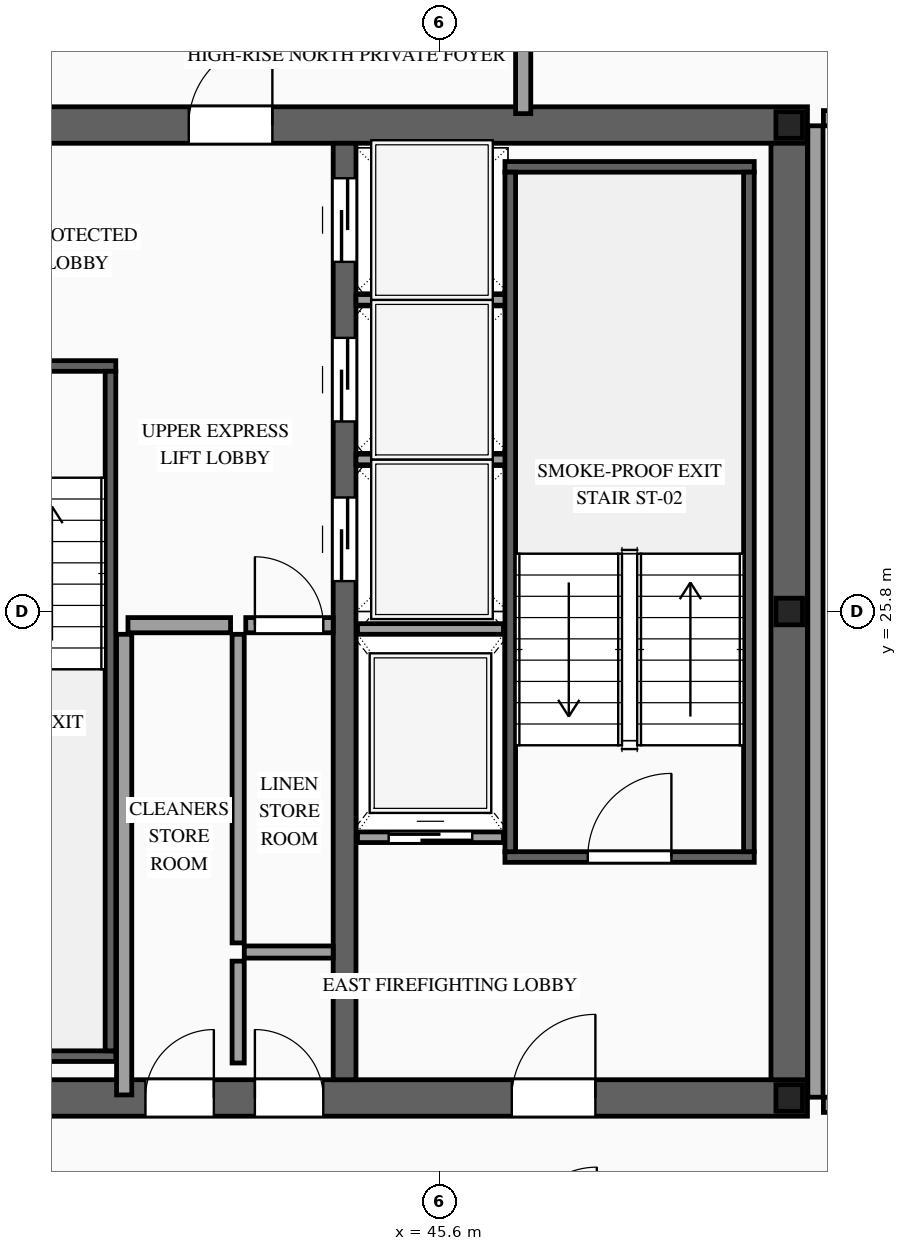
"""IFC4 building model, lengths in metres.
Left out: names, types, materials, properties, quantities, classifications, styles, units other than length and angle.
Written with IfcOpenShell. Run it as: python <this file> out.ifc"""

import sys

from ifc_helpers import new_model, si_unit, direction, frame, frame_2d, origin, origin_2d, place, context, subcontext, project, spatial, rectangle, i_section, extrude, source, transform, mapped, element, fill, save


model = new_model("IFC4")
c1 = context("Model", 3, precision=1e-05, world=origin(), true_north=direction((0.0, 1.0)))
c2 = subcontext(c1, "Body", "Model", "MODEL_VIEW")
j1 = project(units=[si_unit("LENGTHUNIT", "METRE"), si_unit("PLANEANGLEUNIT", "RADIAN")], contexts=[c1])
p1 = place(None, origin())
s1 = spatial("IfcSite", under=j1, at=p1, CompositionType="ELEMENT")
p2 = place(p1, origin())
s2 = spatial("IfcBuilding", under=s1, at=p2, CompositionType="ELEMENT")
p3 = place(p2, frame((0.0, 0.0, 285.6)))
s3 = spatial("IfcBuildingStorey", under=s2, at=p3, CompositionType="ELEMENT", Elevation=285.6)
p4 = place(p3, frame((23.56, 19.4, 0.0), z_axis=(0.0, 0.0, 1.0), x_axis=(1.0, 0.0, 0.0)))
e1 = element("IfcWall", 1, at=p4, inside=s3, PredefinedType="SHEAR", context=c2, shape_type="SweptSolid", body=[
    extrude(rectangle(XDim=26.88, YDim=0.48, at=frame_2d((13.44, 0.0))), origin(), (0.0, 0.0, 1.0), 3.5),
])
p5 = place(p4, frame((1.89, 0.0, 0.0)))
e2 = element("IfcOpeningElement", 2, at=p5, cuts=e1, PredefinedType="OPENING", context=c2, shape_type="SweptSolid", body=[
    extrude(rectangle(XDim=1.1, YDim=2.2, at=frame_2d((0.55, 1.1))), frame((0.0, 0.255, 0.0), z_axis=(0.0, -1.0, 0.0), x_axis=(1.0, 0.0, 0.0)), (0.0, 0.0, 1.0), 0.51),
])
p6 = place(p4, frame((9.79, 0.0, 0.0)))
e3 = element("IfcOpeningElement", 3, at=p6, cuts=e1, PredefinedType="OPENING", context=c2, shape_type="SweptSolid", body=[
    extrude(rectangle(XDim=1.1, YDim=2.2, at=frame_2d((0.55, 1.1))), frame((0.0, 0.255, 0.0), z_axis=(0.0, -1.0, 0.0), x_axis=(1.0, 0.0, 0.0)), (0.0, 0.0, 1.0), 0.51),
])
p7 = place(p4, frame((22.99, 0.0, 0.0)))
e4 = element("IfcOpeningElement", 4, at=p7, cuts=e1, PredefinedType="OPENING", context=c2, shape_type="SweptSolid", body=[
    extrude(rectangle(XDim=1.1, YDim=2.2, at=frame_2d((0.55, 1.1))), frame((0.0, 0.255, 0.0), z_axis=(0.0, -1.0, 0.0), x_axis=(1.0, 0.0, 0.0)), (0.0, 0.0, 1.0), 0.51),
])
p8 = place(p4, frame((19.61, 0.0, 0.0)))
e5 = element("IfcOpeningElement", 5, at=p8, cuts=e1, PredefinedType="OPENING", context=c2, shape_type="SweptSolid", body=[
    extrude(rectangle(XDim=0.9, YDim=2.15, at=frame_2d((0.45, 1.075))), frame((0.0, 0.255, 0.0), z_axis=(0.0, -1.0, 0.0), x_axis=(1.0, 0.0, 0.0)), (0.0, 0.0, 1.0), 0.51),
])
p9 = place(p4, frame((18.17, 0.0, 0.0)))
e6 = element("IfcOpeningElement", 6, at=p9, cuts=e1, PredefinedType="OPENING", context=c2, shape_type="SweptSolid", body=[
    extrude(rectangle(XDim=0.9, YDim=2.15, at=frame_2d((0.45, 1.075))), frame((0.0, 0.255, 0.0), z_axis=(0.0, -1.0, 0.0), x_axis=(1.0, 0.0, 0.0)), (0.0, 0.0, 1.0), 0.51),
])
p10 = place(p3, frame((23.56, 32.2, 0.0), z_axis=(0.0, 0.0, 1.0), x_axis=(1.0, 0.0, 0.0)))
e7 = element("IfcWall", 7, at=p10, inside=s3, PredefinedType="SHEAR", context=c2, shape_type="SweptSolid", body=[
    extrude(rectangle(XDim=26.88, YDim=0.48, at=frame_2d((13.44, 0.0))), origin(), (0.0, 0.0, 1.0), 3.5),
])
p11 = place(p10, frame((4.51, 0.0, 0.0)))
e8 = element("IfcOpeningElement", 8, at=p11, cuts=e7, PredefinedType="OPENING", context=c2, shape_type="SweptSolid", body=[
    extrude(rectangle(XDim=0.9, YDim=2.15, at=frame_2d((0.45, 1.075))), frame((0.0, 0.255, 0.0), z_axis=(0.0, -1.0, 0.0), x_axis=(1.0, 0.0, 0.0)), (0.0, 0.0, 1.0), 0.51),
])
p12 = place(p10, frame((9.79, 0.0, 0.0)))
e9 = element("IfcOpeningElement", 9, at=p12, cuts=e7, PredefinedType="OPENING", context=c2, shape_type="SweptSolid", body=[
    extrude(rectangle(XDim=1.1, YDim=2.2, at=frame_2d((0.55, 1.1))), frame((0.0, 0.255, 0.0), z_axis=(0.0, -1.0, 0.0), x_axis=(1.0, 0.0, 0.0)), (0.0, 0.0, 1.0), 0.51),
])
p13 = place(p10, frame((15.64, 0.0, 0.0)))
e10 = element("IfcOpeningElement", 10, at=p13, cuts=e7, PredefinedType="OPENING", context=c2, shape_type="SweptSolid", body=[
    extrude(rectangle(XDim=1.1, YDim=2.2, at=frame_2d((0.55, 1.1))), frame((0.0, 0.255, 0.0), z_axis=(0.0, -1.0, 0.0), x_axis=(1.0, 0.0, 0.0)), (0.0, 0.0, 1.0), 0.51),
])
p14 = place(p10, frame((18.74, 0.0, 0.0)))
e11 = element("IfcOpeningElement", 11, at=p14, cuts=e7, PredefinedType="OPENING", context=c2, shape_type="SweptSolid", body=[
    extrude(rectangle(XDim=1.1, YDim=2.2, at=frame_2d((0.55, 1.1))), frame((0.0, 0.255, 0.0), z_axis=(0.0, -1.0, 0.0), x_axis=(1.0, 0.0, 0.0)), (0.0, 0.0, 1.0), 0.51),
])
m1 = source(origin(), c2, "Body", "SweptSolid", [
    extrude(rectangle(XDim=12.32, YDim=0.48, at=frame_2d((6.16, 0.0))), origin(), (0.0, 0.0, 1.0), 3.5),
])
p15 = place(p3, frame((50.2, 19.64, 0.0), z_axis=(0.0, 0.0, 1.0), x_axis=(0.0, 1.0, 0.0)))
e12 = element("IfcWall", 12, at=p15, inside=s3, PredefinedType="SHEAR", context=c2, shape_type="MappedRepresentation", body=[
    mapped(m1, transform((0.0, 0.0, 0.0), scale=1.0)),
])
p16 = place(p3, frame((44.35, 19.64, 0.0), z_axis=(0.0, 0.0, 1.0), x_axis=(0.0, 1.0, 0.0)))
e13 = element("IfcWall", 13, at=p16, inside=s3, PredefinedType="SOLIDWALL", context=c2, shape_type="SweptSolid", body=[
    extrude(rectangle(XDim=12.32, YDim=0.3, at=frame_2d((6.16, 0.0))), origin(), (0.0, 0.0, 1.0), 3.5),
])
p17 = place(p16, frame((6.56, 0.0, 0.0)))
e14 = element("IfcOpeningElement", 14, at=p17, cuts=e13, PredefinedType="OPENING", context=c2, shape_type="SweptSolid", body=[
    extrude(rectangle(XDim=1.1, YDim=2.2, at=frame_2d((0.55, 1.1))), frame((0.0, 0.165, 0.0), z_axis=(0.0, -1.0, 0.0), x_axis=(1.0, 0.0, 0.0)), (0.0, 0.0, 1.0), 0.33),
])
p18 = place(p16, frame((8.66, 0.0, 0.0)))
e15 = element("IfcOpeningElement", 15, at=p18, cuts=e13, PredefinedType="OPENING", context=c2, shape_type="SweptSolid", body=[
    extrude(rectangle(XDim=1.1, YDim=2.2, at=frame_2d((0.55, 1.1))), frame((0.0, 0.165, 0.0), z_axis=(0.0, -1.0, 0.0), x_axis=(1.0, 0.0, 0.0)), (0.0, 0.0, 1.0), 0.33),
])
p19 = place(p16, frame((10.76, 0.0, 0.0)))
e16 = element("IfcOpeningElement", 16, at=p19, cuts=e13, PredefinedType="OPENING", context=c2, shape_type="SweptSolid", body=[
    extrude(rectangle(XDim=1.1, YDim=2.2, at=frame_2d((0.55, 1.1))), frame((0.0, 0.165, 0.0), z_axis=(0.0, -1.0, 0.0), x_axis=(1.0, 0.0, 0.0)), (0.0, 0.0, 1.0), 0.33),
])
m2 = source(origin(), c2, "Body", "SweptSolid", [
    extrude(i_section(OverallWidth=0.35, OverallDepth=0.35, WebThickness=0.012, FlangeThickness=0.019, at=origin_2d()), origin(), (0.0, 0.0, 1.0), 3.5),
])
for number, where, z_axis, x_axis in (
    (17, (50.2, 19.4, 0.0), (0.0, 0.0, 1.0), (1.0, 0.0, 0.0)),
    (18, (50.2, 25.8, 0.0), (0.0, 0.0, 1.0), (1.0, 0.0, 0.0)),
    (19, (50.2, 32.2, 0.0), (0.0, 0.0, 1.0), (1.0, 0.0, 0.0)),
):
    element("IfcColumn", number, at=place(p3, frame(where, z_axis=z_axis, x_axis=x_axis)), inside=s3, PredefinedType="COLUMN", context=c2, shape_type="MappedRepresentation", body=[
        mapped(m2, transform((0.0, 0.0, 0.0), scale=1.0)),
    ])
p20 = place(p3, frame((44.52, 22.83, 0.0), z_axis=(0.0, 0.0, 1.0), x_axis=(1.0, 0.0, 0.0)))
e20 = element("IfcWall", 20, at=p20, inside=s3, PredefinedType="SOLIDWALL", context=c2, shape_type="SweptSolid", body=[
    extrude(rectangle(XDim=1.92, YDim=0.14, at=frame_2d((0.96, 0.0))), origin(), (0.0, 0.0, 1.0), 3.28),
])
p21 = place(p20, frame((0.41, 0.0, 0.0)))
e21 = element("IfcOpeningElement", 21, at=p21, cuts=e20, PredefinedType="OPENING", context=c2, shape_type="SweptSolid", body=[
    extrude(rectangle(XDim=1.1, YDim=2.2, at=frame_2d((0.55, 1.1))), frame((0.0, 0.085, 0.0), z_axis=(0.0, -1.0, 0.0), x_axis=(1.0, 0.0, 0.0)), (0.0, 0.0, 1.0), 0.17),
])
m3 = source(origin(), c2, "Body", "SweptSolid", [
    extrude(rectangle(XDim=1.92, YDim=0.14, at=frame_2d((0.96, 0.0))), origin(), (0.0, 0.0, 1.0), 3.28),
])
p22 = place(p3, frame((44.52, 25.57, 0.0), z_axis=(0.0, 0.0, 1.0), x_axis=(1.0, 0.0, 0.0)))
e22 = element("IfcWall", 22, at=p22, inside=s3, PredefinedType="SOLIDWALL", context=c2, shape_type="MappedRepresentation", body=[
    mapped(m3, transform((0.0, 0.0, 0.0), scale=1.0)),
])
m4 = source(origin(), c2, "Body", "SweptSolid", [
    extrude(rectangle(XDim=2.0, YDim=0.14, at=frame_2d((1.0, 0.0))), origin(), (0.0, 0.0, 1.0), 3.28),
])
for number, where, z_axis, x_axis in (
    (23, (44.5, 27.8, 0.0), (0.0, 0.0, 1.0), (1.0, 0.0, 0.0)),
    (24, (44.5, 29.9, 0.0), (0.0, 0.0, 1.0), (1.0, 0.0, 0.0)),
):
    element("IfcWall", number, at=place(p3, frame(where, z_axis=z_axis, x_axis=x_axis)), inside=s3, PredefinedType="SOLIDWALL", context=c2, shape_type="MappedRepresentation", body=[
        mapped(m4, transform((0.0, 0.0, 0.0), scale=1.0)),
    ])
p23 = place(p3, frame((46.46, 22.57, 0.0), z_axis=(0.0, 0.0, 1.0), x_axis=(1.0, 0.0, 0.0)))
e25 = element("IfcWall", 25, at=p23, inside=s3, PredefinedType="SOLIDWALL", context=c2, shape_type="SweptSolid", body=[
    extrude(rectangle(XDim=3.28, YDim=0.14, at=frame_2d((1.64, 0.0))), origin(), (0.0, 0.0, 1.0), 3.28),
])
p24 = place(p23, frame((1.09, 0.0, 0.0)))
e26 = element("IfcOpeningElement", 26, at=p24, cuts=e25, PredefinedType="OPENING", context=c2, shape_type="SweptSolid", body=[
    extrude(rectangle(XDim=1.1, YDim=2.2, at=frame_2d((0.55, 1.1))), frame((0.0, 0.085, 0.0), z_axis=(0.0, -1.0, 0.0), x_axis=(1.0, 0.0, 0.0)), (0.0, 0.0, 1.0), 0.17),
])
m5 = source(origin(), c2, "Body", "SweptSolid", [
    extrude(rectangle(XDim=3.28, YDim=0.14, at=frame_2d((1.64, 0.0))), origin(), (0.0, 0.0, 1.0), 3.28),
])
p25 = place(p3, frame((46.46, 31.65, 0.0), z_axis=(0.0, 0.0, 1.0), x_axis=(1.0, 0.0, 0.0)))
e27 = element("IfcWall", 27, at=p25, inside=s3, PredefinedType="SOLIDWALL", context=c2, shape_type="MappedRepresentation", body=[
    mapped(m5, transform((0.0, 0.0, 0.0), scale=1.0)),
])
m6 = source(origin(), c2, "Body", "SweptSolid", [
    extrude(rectangle(XDim=8.94, YDim=0.14, at=frame_2d((4.47, 0.0))), origin(), (0.0, 0.0, 1.0), 3.28),
])
for number, where, z_axis, x_axis in (
    (28, (46.53, 22.64, 0.0), (0.0, 0.0, 1.0), (0.0, 1.0, 0.0)),
    (29, (49.67, 22.64, 0.0), (0.0, 0.0, 1.0), (0.0, 1.0, 0.0)),
):
    element("IfcWall", number, at=place(p3, frame(where, z_axis=z_axis, x_axis=x_axis)), inside=s3, PredefinedType="SOLIDWALL", context=c2, shape_type="MappedRepresentation", body=[
        mapped(m6, transform((0.0, 0.0, 0.0), scale=1.0)),
    ])
p26 = place(p3, frame((38.2, 29.03, 0.0), z_axis=(0.0, 0.0, 1.0), x_axis=(1.0, 0.0, 0.0)))
e30 = element("IfcWall", 30, at=p26, inside=s3, PredefinedType="SOLIDWALL", context=c2, shape_type="SweptSolid", body=[
    extrude(rectangle(XDim=3.14, YDim=0.14, at=frame_2d((1.57, 0.0))), origin(), (0.0, 0.0, 1.0), 3.28),
])
p27 = place(p26, frame((1.02, 0.0, 0.0)))
e31 = element("IfcOpeningElement", 31, at=p27, cuts=e30, PredefinedType="OPENING", context=c2, shape_type="SweptSolid", body=[
    extrude(rectangle(XDim=1.1, YDim=2.2, at=frame_2d((0.55, 1.1))), frame((0.0, 0.085, 0.0), z_axis=(0.0, -1.0, 0.0), x_axis=(1.0, 0.0, 0.0)), (0.0, 0.0, 1.0), 0.17),
])
m7 = source(origin(), c2, "Body", "SweptSolid", [
    extrude(rectangle(XDim=3.14, YDim=0.14, at=frame_2d((1.57, 0.0))), origin(), (0.0, 0.0, 1.0), 3.28),
])
p28 = place(p3, frame((38.2, 19.95, 0.0), z_axis=(0.0, 0.0, 1.0), x_axis=(1.0, 0.0, 0.0)))
e32 = element("IfcWall", 32, at=p28, inside=s3, PredefinedType="SOLIDWALL", context=c2, shape_type="MappedRepresentation", body=[
    mapped(m7, transform((0.0, 0.0, 0.0), scale=1.0)),
])
m8 = source(origin(), c2, "Body", "SweptSolid", [
    extrude(rectangle(XDim=8.94, YDim=0.14, at=frame_2d((4.47, 0.0))), origin(), (0.0, 0.0, 1.0), 3.28),
])
p29 = place(p3, frame((41.27, 20.02, 0.0), z_axis=(0.0, 0.0, 1.0), x_axis=(0.0, 1.0, 0.0)))
e33 = element("IfcWall", 33, at=p29, inside=s3, PredefinedType="SOLIDWALL", context=c2, shape_type="MappedRepresentation", body=[
    mapped(m8, transform((0.0, 0.0, 0.0), scale=1.0)),
])
m9 = source(origin(), c2, "Body", "SweptSolid", [
    extrude(rectangle(XDim=1.34, YDim=0.16, at=frame_2d((0.67, 0.0))), origin(), (0.0, 0.0, 1.0), 3.28),
])
p30 = place(p3, frame((42.95, 19.86, 0.0), z_axis=(0.0, 0.0, 1.0), x_axis=(0.0, 1.0, 0.0)))
e34 = element("IfcWall", 34, at=p30, inside=s3, PredefinedType="PARTITIONING", context=c2, shape_type="MappedRepresentation", body=[
    mapped(m9, transform((0.0, 0.0, 0.0), scale=1.0)),
])
m10 = source(origin(), c2, "Body", "SweptSolid", [
    extrude(rectangle(XDim=1.17, YDim=0.16, at=frame_2d((0.585, 0.0))), origin(), (0.0, 0.0, 1.0), 3.28),
])
p31 = place(p3, frame((43.03, 21.32, 0.0), z_axis=(0.0, 0.0, 1.0), x_axis=(1.0, 0.0, 0.0)))
e35 = element("IfcWall", 35, at=p31, inside=s3, PredefinedType="PARTITIONING", context=c2, shape_type="MappedRepresentation", body=[
    mapped(m10, transform((0.0, 0.0, 0.0), scale=1.0)),
])
m11 = source(origin(), c2, "Body", "SweptSolid", [
    extrude(rectangle(XDim=6.06, YDim=0.2, at=frame_2d((3.03, 0.0))), origin(), (0.0, 0.0, 1.0), 3.28),
])
p32 = place(p3, frame((41.45, 19.44, 0.0), z_axis=(0.0, 0.0, 1.0), x_axis=(0.0, 1.0, 0.0)))
e36 = element("IfcWall", 36, at=p32, inside=s3, PredefinedType="PARTITIONING", context=c2, shape_type="MappedRepresentation", body=[
    mapped(m11, transform((0.0, 0.0, 0.0), scale=1.0)),
])
m12 = source(origin(), c2, "Body", "SweptSolid", [
    extrude(rectangle(XDim=1.35, YDim=0.2, at=frame_2d((0.675, 0.0))), origin(), (0.0, 0.0, 1.0), 3.28),
])
p33 = place(p3, frame((41.5, 25.62, 0.0), z_axis=(0.0, 0.0, 1.0), x_axis=(1.0, 0.0, 0.0)))
e37 = element("IfcWall", 37, at=p33, inside=s3, PredefinedType="PARTITIONING", context=c2, shape_type="MappedRepresentation", body=[
    mapped(m12, transform((0.0, 0.0, 0.0), scale=1.0)),
])
m13 = source(origin(), c2, "Body", "SweptSolid", [
    extrude(rectangle(XDim=4.06, YDim=0.16, at=frame_2d((2.03, 0.0))), origin(), (0.0, 0.0, 1.0), 3.28),
])
p34 = place(p3, frame((42.95, 21.44, 0.0), z_axis=(0.0, 0.0, 1.0), x_axis=(0.0, 1.0, 0.0)))
e38 = element("IfcWall", 38, at=p34, inside=s3, PredefinedType="PARTITIONING", context=c2, shape_type="MappedRepresentation", body=[
    mapped(m13, transform((0.0, 0.0, 0.0), scale=1.0)),
])
p35 = place(p3, frame((43.05, 25.62, 0.0), z_axis=(0.0, 0.0, 1.0), x_axis=(1.0, 0.0, 0.0)))
e39 = element("IfcWall", 39, at=p35, inside=s3, PredefinedType="PARTITIONING", context=c2, shape_type="SweptSolid", body=[
    extrude(rectangle(XDim=1.15, YDim=0.2, at=frame_2d((0.575, 0.0))), origin(), (0.0, 0.0, 1.0), 3.28),
])
p36 = place(p35, frame((0.12, 0.0, 0.0)))
e40 = element("IfcOpeningElement", 40, at=p36, cuts=e39, PredefinedType="OPENING", context=c2, shape_type="SweptSolid", body=[
    extrude(rectangle(XDim=0.9, YDim=2.15, at=frame_2d((0.45, 1.075))), frame((0.0, 0.115, 0.0), z_axis=(0.0, -1.0, 0.0), x_axis=(1.0, 0.0, 0.0)), (0.0, 0.0, 1.0), 0.23),
])
m14 = source(origin(), c2, "Body", "SweptSolid", [
    extrude(rectangle(XDim=1.7, YDim=0.2, at=frame_2d((0.85, 0.0))), origin(), (0.0, 0.0, 1.0), 3.28),
])
p37 = place(p3, frame((46.7, 32.35, 0.0), z_axis=(0.0, 0.0, 1.0), x_axis=(0.0, 1.0, 0.0)))
e41 = element("IfcWall", 41, at=p37, inside=s3, PredefinedType="PARTITIONING", context=c2, shape_type="MappedRepresentation", body=[
    mapped(m14, transform((0.0, 0.0, 0.0), scale=1.0)),
])
p38 = place(p3, frame((50.65, 19.31, 0.0), z_axis=(0.0, 0.0, 1.0), x_axis=(1.0, 0.0, 0.0)))
e42 = element("IfcWall", 42, at=p38, inside=s3, PredefinedType="PARTITIONING", context=c2, shape_type="SweptSolid", body=[
    extrude(rectangle(XDim=5.3, YDim=0.2, at=frame_2d((2.65, 0.0))), origin(), (0.0, 0.0, 1.0), 2.825),
])
p39 = place(p38, frame((0.4, 0.0, 0.0)))
e43 = element("IfcOpeningElement", 43, at=p39, cuts=e42, PredefinedType="OPENING", context=c2, shape_type="SweptSolid", body=[
    extrude(rectangle(XDim=1.0, YDim=2.2, at=frame_2d((0.5, 1.1))), frame((0.0, 0.115, 0.0), z_axis=(0.0, -1.0, 0.0), x_axis=(1.0, 0.0, 0.0)), (0.0, 0.0, 1.0), 0.23),
])
m15 = source(origin(), c2, "Body", "SweptSolid", [
    extrude(rectangle(XDim=5.3, YDim=0.2, at=frame_2d((2.65, 0.0))), origin(), (0.0, 0.0, 1.0), 2.825),
])
p40 = place(p3, frame((50.65, 32.29, 0.0), z_axis=(0.0, 0.0, 1.0), x_axis=(1.0, 0.0, 0.0)))
e44 = element("IfcWall", 44, at=p40, inside=s3, PredefinedType="PARTITIONING", context=c2, shape_type="MappedRepresentation", body=[
    mapped(m15, transform((0.0, 0.0, 0.0), scale=1.0)),
])
m16 = source(origin(), c2, "Body", "SweptSolid", [
    extrude(rectangle(XDim=12.78, YDim=0.2, at=frame_2d((6.39, 0.0))), origin(), (0.0, 0.0, 1.0), 3.28),
])
p41 = place(p3, frame((50.545, 19.41, 0.0), z_axis=(0.0, 0.0, 1.0), x_axis=(0.0, 1.0, 0.0)))
e45 = element("IfcWall", 45, at=p41, inside=s3, PredefinedType="PARTITIONING", context=c2, shape_type="MappedRepresentation", body=[
    mapped(m16, transform((0.0, 0.0, 0.0), scale=1.0)),
])
m17 = source(origin(), c2, "Body", "SweptSolid", [
    extrude(rectangle(XDim=1.1, YDim=2.2, at=frame_2d((0.55, 1.1))), frame((0.0, 0.025, 0.0), z_axis=(0.0, -1.0, 0.0), x_axis=(1.0, 0.0, 0.0)), (0.0, 0.0, 1.0), 0.05),
])
p42 = place(p21, origin())
e46 = element("IfcDoor", 46, at=p42, inside=s3, OperationType="SLIDING_TO_RIGHT", PredefinedType="DOOR", context=c2, shape_type="MappedRepresentation", body=[
    mapped(m17, transform((0.0, 0.0, 0.0), scale=1.0)),
])
fill(e21, e46)
p43 = place(p17, origin())
e47 = element("IfcDoor", 47, at=p43, inside=s3, OperationType="SLIDING_TO_LEFT", PredefinedType="DOOR", context=c2, shape_type="MappedRepresentation", body=[
    mapped(m17, transform((0.0, 0.0, 0.0), scale=1.0)),
])
fill(e14, e47)
p44 = place(p18, origin())
e48 = element("IfcDoor", 48, at=p44, inside=s3, OperationType="SLIDING_TO_RIGHT", PredefinedType="DOOR", context=c2, shape_type="MappedRepresentation", body=[
    mapped(m17, transform((0.0, 0.0, 0.0), scale=1.0)),
])
fill(e15, e48)
p45 = place(p19, origin())
e49 = element("IfcDoor", 49, at=p45, inside=s3, OperationType="SLIDING_TO_LEFT", PredefinedType="DOOR", context=c2, shape_type="MappedRepresentation", body=[
    mapped(m17, transform((0.0, 0.0, 0.0), scale=1.0)),
])
fill(e16, e49)
m18 = source(origin(), c2, "Body", "SweptSolid", [
    extrude(rectangle(XDim=1.1, YDim=2.2, at=frame_2d((0.55, 1.1))), frame((0.0, 0.025, 0.0), z_axis=(0.0, -1.0, 0.0), x_axis=(1.0, 0.0, 0.0)), (0.0, 0.0, 1.0), 0.05),
])
p46 = place(p24, origin())
e50 = element("IfcDoor", 50, at=p46, inside=s3, OperationType="SINGLE_SWING_RIGHT", PredefinedType="DOOR", context=c2, shape_type="MappedRepresentation", body=[
    mapped(m18, transform((0.0, 0.0, 0.0), scale=1.0)),
])
fill(e26, e50)
p47 = place(p7, origin())
e51 = element("IfcDoor", 51, at=p47, inside=s3, OperationType="SINGLE_SWING_RIGHT", PredefinedType="DOOR", context=c2, shape_type="MappedRepresentation", body=[
    mapped(m18, transform((0.0, 0.0, 0.0), scale=1.0)),
])
fill(e4, e51)
p48 = place(p14, origin())
e52 = element("IfcDoor", 52, at=p48, inside=s3, OperationType="SINGLE_SWING_RIGHT", PredefinedType="DOOR", context=c2, shape_type="MappedRepresentation", body=[
    mapped(m18, transform((0.0, 0.0, 0.0), scale=1.0)),
])
fill(e11, e52)
m19 = source(origin(), c2, "Body", "SweptSolid", [
    extrude(rectangle(XDim=0.9, YDim=2.15, at=frame_2d((0.45, 1.075))), frame((0.0, 0.025, 0.0), z_axis=(0.0, -1.0, 0.0), x_axis=(1.0, 0.0, 0.0)), (0.0, 0.0, 1.0), 0.05),
])
p49 = place(p8, origin())
e53 = element("IfcDoor", 53, at=p49, inside=s3, OperationType="SINGLE_SWING_LEFT", PredefinedType="DOOR", context=c2, shape_type="MappedRepresentation", body=[
    mapped(m19, transform((0.0, 0.0, 0.0), scale=1.0)),
])
fill(e5, e53)
p50 = place(p9, origin())
e54 = element("IfcDoor", 54, at=p50, inside=s3, OperationType="SINGLE_SWING_RIGHT", PredefinedType="DOOR", context=c2, shape_type="MappedRepresentation", body=[
    mapped(m19, transform((0.0, 0.0, 0.0), scale=1.0)),
])
fill(e6, e54)
p51 = place(p36, origin())
e55 = element("IfcDoor", 55, at=p51, inside=s3, OperationType="SINGLE_SWING_LEFT", PredefinedType="DOOR", context=c2, shape_type="MappedRepresentation", body=[
    mapped(m19, transform((0.0, 0.0, 0.0), scale=1.0)),
])
fill(e40, e55)
save(model, sys.argv[1])
